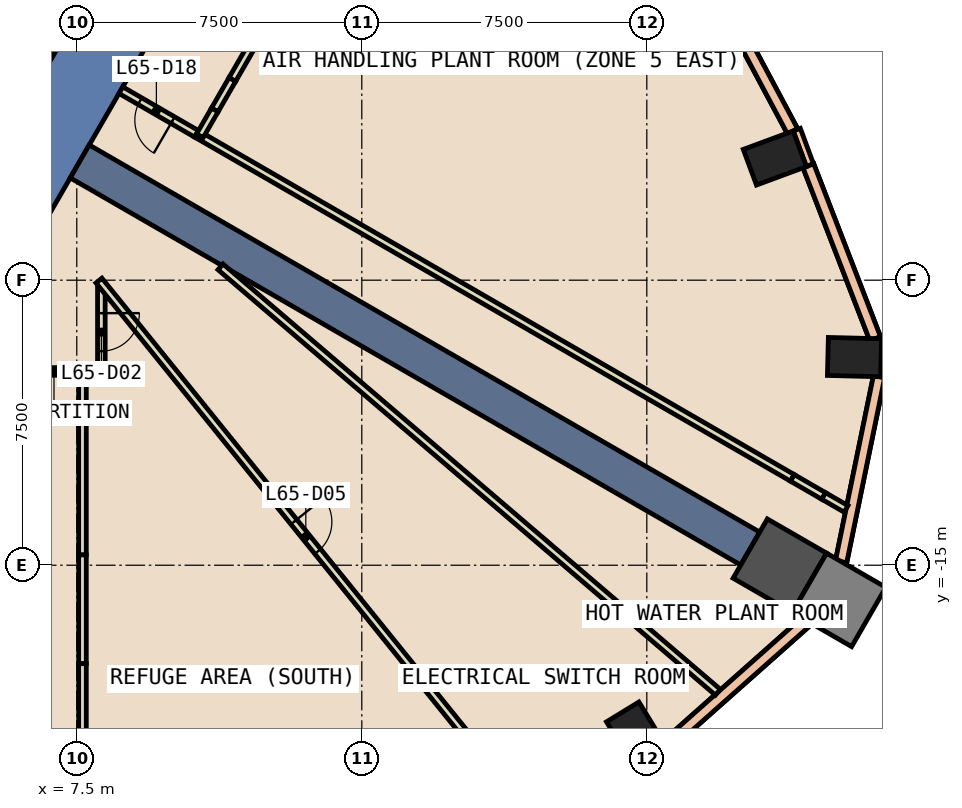
"""IFC4 building model, lengths in metres.
Left out: names, types, materials, properties, quantities, classifications, styles, units other than length and angle.
Written with IfcOpenShell. Run it as: python <this file> out.ifc"""

import sys

from ifc_helpers import new_model, si_unit, direction, frame, frame_2d, origin, origin_2d, place, context, subcontext, project, spatial, polyline, rectangle, outline, extrude, element, fill, save


model = new_model("IFC4")
c1 = context("Model", 3, precision=1e-05, world=origin(), true_north=direction((0.0, 1.0)))
c2 = subcontext(c1, "Body", "Model", "MODEL_VIEW")
j1 = project(units=[si_unit("LENGTHUNIT", "METRE"), si_unit("PLANEANGLEUNIT", "RADIAN")], contexts=[c1])
p1 = place(None, origin())
s1 = spatial("IfcSite", under=j1, at=p1, CompositionType="ELEMENT")
p2 = place(p1, origin())
s2 = spatial("IfcBuilding", under=s1, at=p2, CompositionType="ELEMENT")
p3 = place(p2, frame((0.0, 0.0, 281.0)))
s3 = spatial("IfcBuildingStorey", under=s2, at=p3, CompositionType="ELEMENT", Elevation=281.0)
p4 = place(p3, frame((22.231, -19.457, -0.6), z_axis=(0.0, 0.0, 1.0), x_axis=(0.853341581839, 0.521352227103, 0.0)))
e1 = element("IfcColumn", 1, at=p4, inside=s3, PredefinedType="COLUMN", context=c2, shape_type="SweptSolid", body=[
    extrude(rectangle(XDim=1.0, YDim=1.4, at=origin_2d()), origin(), (0.0, 0.0, 1.0), 5.4),
])
p5 = place(p3, frame((26.001, -15.012, -0.6), z_axis=(0.0, 0.0, 1.0), x_axis=(-0.866025403784, 0.5, 0.0)))
e2 = element("IfcColumn", 2, at=p5, inside=s3, PredefinedType="COLUMN", context=c2, shape_type="SweptSolid", body=[
    extrude(rectangle(XDim=1.8, YDim=1.8, at=origin_2d()), origin(), (0.0, 0.0, 1.0), 5.4),
])
for number, where, z_axis, x_axis in (
    (3, (27.965, -9.524, -0.6), (0.0, 0.0, 1.0), (0.025, 1.0, 0.0)),
    (4, (25.869, -4.285, -0.6), (0.0, 0.0, 1.0), (-0.347, 0.938, 0.0)),
):
    element("IfcColumn", number, at=place(p3, frame(where, z_axis=z_axis, x_axis=x_axis)), inside=s3, PredefinedType="COLUMN", context=c2, shape_type="SweptSolid", body=[
        extrude(rectangle(XDim=1.0, YDim=1.4, at=origin_2d()), origin(), (0.0, 0.0, 1.0), 5.4),
    ])
p6 = place(p3, frame((27.56, -15.912, -0.6), z_axis=(0.0, 0.0, 1.0), x_axis=(-0.866025403784, 0.5, 0.0)))
e5 = element("IfcColumn", 5, at=p6, inside=s3, PredefinedType="COLUMN", context=c2, shape_type="SweptSolid", body=[
    extrude(rectangle(XDim=1.8, YDim=1.8, at=origin_2d()), origin(), (0.0, 0.0, 1.0), 5.4),
])
p7 = place(p3, frame((0.0, 0.0, -0.6)))
e6 = element("IfcWall", 6, at=p7, inside=s3, PredefinedType="SHEAR", context=c2, shape_type="SweptSolid", body=[
    extrude(outline(polyline([(5.774, -7.5), (11.547, 2.5), (9.238, 2.5), (4.619, -5.5), (5.774, -7.5)])), origin(), (0.0, 0.0, 1.0), 5.4),
])
p8 = place(p3, frame((7.578, -4.375, 0.0), z_axis=(0.0, 0.0, 1.0), x_axis=(0.866020754303, -0.500008053052, 0.0)))
e7 = element("IfcWall", 7, at=p8, inside=s3, PredefinedType="SHEAR", context=c2, shape_type="SweptSolid", body=[
    extrude(rectangle(XDim=20.374, YDim=1.0, at=frame_2d((10.187, 0.0))), origin(), (0.0, 0.0, 1.0), 4.8),
])
p9 = place(p3, frame((26.793, -4.477, 0.0), z_axis=(0.0, 0.0, 1.0), x_axis=(-0.346892928577, 0.937904737222, 0.0)))
e8 = element("IfcWall", 8, at=p9, inside=s3, PredefinedType="STANDARD", context=c2, shape_type="SweptSolid", body=[
    extrude(rectangle(XDim=1.0, YDim=0.2, at=frame_2d((0.5, 0.0))), origin(), (0.0, 0.0, 1.0), 4.8),
])
p10 = place(p3, frame((28.753, -10.043, 0.0), z_axis=(0.0, 0.0, 1.0), x_axis=(0.024186470916, 0.999707464524, 0.0)))
e9 = element("IfcWall", 9, at=p10, inside=s3, PredefinedType="STANDARD", context=c2, shape_type="SweptSolid", body=[
    extrude(rectangle(XDim=0.999, YDim=0.2, at=frame_2d((0.5, 0.0))), origin(), (0.0, 0.0, 1.0), 4.8),
])
p11 = place(p3, frame((23.0, -19.758, 0.0), z_axis=(0.0, 0.0, 1.0), x_axis=(0.747938022937, 0.663768569492, 0.0)))
e10 = element("IfcWall", 10, at=p11, inside=s3, PredefinedType="STANDARD", context=c2, shape_type="SweptSolid", body=[
    extrude(rectangle(XDim=4.966, YDim=0.3, at=frame_2d((2.483, 0.0))), origin(), (0.0, 0.0, 1.0), 1.2),
])
p12 = place(p3, frame((23.0, -19.758, 4.0), z_axis=(0.0, 0.0, 1.0), x_axis=(0.747938022937, 0.663768569492, 0.0)))
e11 = element("IfcWall", 11, at=p12, inside=s3, PredefinedType="STANDARD", context=c2, shape_type="SweptSolid", body=[
    extrude(rectangle(XDim=4.966, YDim=0.3, at=frame_2d((2.483, 0.0))), origin(), (0.0, 0.0, 1.0), 0.8),
])
p13 = place(p3, frame((27.613, -14.905, 0.0), z_axis=(0.0, 0.0, 1.0), x_axis=(0.200924793816, 0.979606669654, 0.0)))
e12 = element("IfcWall", 12, at=p13, inside=s3, PredefinedType="STANDARD", context=c2, shape_type="SweptSolid", body=[
    extrude(rectangle(XDim=4.967, YDim=0.3, at=frame_2d((2.484, 0.0))), origin(), (0.0, 0.0, 1.0), 1.2),
])
p14 = place(p3, frame((27.613, -14.905, 4.0), z_axis=(0.0, 0.0, 1.0), x_axis=(0.200924793816, 0.979606669654, 0.0)))
e13 = element("IfcWall", 13, at=p14, inside=s3, PredefinedType="STANDARD", context=c2, shape_type="SweptSolid", body=[
    extrude(rectangle(XDim=4.967, YDim=0.3, at=frame_2d((2.484, 0.0))), origin(), (0.0, 0.0, 1.0), 0.8),
])
p15 = place(p3, frame((28.508, -9.038, 0.0), z_axis=(0.0, 0.0, 1.0), x_axis=(-0.360267544186, 0.932849021335, 0.0)))
e14 = element("IfcWall", 14, at=p15, inside=s3, PredefinedType="STANDARD", context=c2, shape_type="SweptSolid", body=[
    extrude(rectangle(XDim=4.875, YDim=0.3, at=frame_2d((2.437, 0.0))), origin(), (0.0, 0.0, 1.0), 1.2),
])
p16 = place(p3, frame((28.508, -9.038, 4.0), z_axis=(0.0, 0.0, 1.0), x_axis=(-0.360267544186, 0.932849021335, 0.0)))
e15 = element("IfcWall", 15, at=p16, inside=s3, PredefinedType="STANDARD", context=c2, shape_type="SweptSolid", body=[
    extrude(rectangle(XDim=4.875, YDim=0.3, at=frame_2d((2.437, 0.0))), origin(), (0.0, 0.0, 1.0), 0.8),
])
p17 = place(p3, frame((26.334, -3.581, 0.0), z_axis=(0.0, 0.0, 1.0), x_axis=(-0.470796778214, 0.882241686628, 0.0)))
e16 = element("IfcWall", 16, at=p17, inside=s3, PredefinedType="STANDARD", context=c2, shape_type="SweptSolid", body=[
    extrude(rectangle(XDim=5.833, YDim=0.3, at=frame_2d((2.917, 0.0))), origin(), (0.0, 0.0, 1.0), 1.2),
])
p18 = place(p3, frame((26.334, -3.581, 4.0), z_axis=(0.0, 0.0, 1.0), x_axis=(-0.470796778214, 0.882241686628, 0.0)))
e17 = element("IfcWall", 17, at=p18, inside=s3, PredefinedType="STANDARD", context=c2, shape_type="SweptSolid", body=[
    extrude(rectangle(XDim=5.833, YDim=0.3, at=frame_2d((2.917, 0.0))), origin(), (0.0, 0.0, 1.0), 0.8),
])
p19 = place(p3, frame((6.251, -9.901, 0.0), z_axis=(0.0, 0.0, 1.0), x_axis=(1.0, 0.0, 0.0)))
e18 = element("IfcWall", 18, at=p19, inside=s3, PredefinedType="PARTITIONING", context=c2, shape_type="SweptSolid", body=[
    extrude(rectangle(XDim=1.299, YDim=0.2, at=frame_2d((0.649, 0.0))), origin(), (0.0, 0.0, 1.0), 2.4),
])
p20 = place(p3, frame((8.147, -7.688, 0.0), z_axis=(0.0, 0.0, 1.0), x_axis=(0.0, -1.0, 0.0)))
e19 = element("IfcWall", 19, at=p20, inside=s3, PredefinedType="PARTITIONING", context=c2, shape_type="SweptSolid", body=[
    extrude(rectangle(XDim=2.312, YDim=0.2, at=frame_2d((1.156, 0.0))), origin(), (0.0, 0.0, 1.0), 4.8),
])
p21 = place(p20, frame((0.679, 0.0, 0.0)))
e20 = element("IfcOpeningElement", 20, at=p21, cuts=e19, PredefinedType="OPENING", context=c2, shape_type="SweptSolid", body=[
    extrude(rectangle(XDim=1.0, YDim=2.1, at=frame_2d((0.5, 1.05))), frame((0.0, 0.11, 0.0), z_axis=(0.0, -1.0, 0.0), x_axis=(1.0, 0.0, 0.0)), (0.0, 0.0, 1.0), 0.22),
])
p22 = place(p3, frame((7.65, -9.801, 0.0), z_axis=(0.0, 0.0, 1.0), x_axis=(0.0, -1.0, 0.0)))
e21 = element("IfcWall", 21, at=p22, inside=s3, PredefinedType="PARTITIONING", context=c2, shape_type="SweptSolid", body=[
    extrude(rectangle(XDim=0.377, YDim=0.2, at=frame_2d((0.188, 0.0))), origin(), (0.0, 0.0, 1.0), 2.4),
])
p23 = place(p3, frame((8.084, -7.51, 0.0), z_axis=(0.0, 0.0, 1.0), x_axis=(0.628300137945, -0.777971038445, 0.0)))
e22 = element("IfcWall", 22, at=p23, inside=s3, PredefinedType="PARTITIONING", context=c2, shape_type="SweptSolid", body=[
    extrude(rectangle(XDim=16.141, YDim=0.2, at=frame_2d((8.07, 0.0))), origin(), (0.0, 0.0, 1.0), 4.8),
])
p24 = place(p23, frame((8.163, 0.0, 0.0)))
e23 = element("IfcOpeningElement", 23, at=p24, cuts=e22, PredefinedType="OPENING", context=c2, shape_type="SweptSolid", body=[
    extrude(rectangle(XDim=1.0, YDim=2.1, at=frame_2d((0.5, 1.05))), frame((0.0, 0.11, 0.0), z_axis=(0.0, -1.0, 0.0), x_axis=(1.0, 0.0, 0.0)), (0.0, 0.0, 1.0), 0.22),
])
p25 = place(p3, frame((11.282, -7.149, 0.0), z_axis=(0.0, 0.0, 1.0), x_axis=(0.759981627741, -0.64994455571, 0.0)))
e24 = element("IfcWall", 24, at=p25, inside=s3, PredefinedType="PARTITIONING", context=c2, shape_type="SweptSolid", body=[
    extrude(rectangle(XDim=17.222, YDim=0.2, at=frame_2d((8.611, 0.0))), origin(), (0.0, 0.0, 1.0), 4.8),
])
p26 = place(p3, frame((10.652, -3.65, 0.0), z_axis=(0.0, 0.0, 1.0), x_axis=(-0.866079547155, 0.499906209203, 0.0)))
e25 = element("IfcWall", 25, at=p26, inside=s3, PredefinedType="PARTITIONING", context=c2, shape_type="SweptSolid", body=[
    extrude(rectangle(XDim=2.3, YDim=0.2, at=frame_2d((1.15, 0.0))), origin(), (0.0, 0.0, 1.0), 4.8),
])
p27 = place(p26, frame((0.721, 0.0, 0.0)))
e26 = element("IfcOpeningElement", 26, at=p27, cuts=e25, PredefinedType="OPENING", context=c2, shape_type="SweptSolid", body=[
    extrude(rectangle(XDim=1.0, YDim=2.1, at=frame_2d((0.5, 1.05))), frame((0.0, 0.11, 0.0), z_axis=(0.0, -1.0, 0.0), x_axis=(1.0, 0.0, 0.0)), (0.0, 0.0, 1.0), 0.22),
])
p28 = place(p3, frame((10.652, -3.65, 0.0), z_axis=(0.0, 0.0, 1.0), x_axis=(0.86603131093, -0.499989768384, 0.0)))
e27 = element("IfcWall", 27, at=p28, inside=s3, PredefinedType="PARTITIONING", context=c2, shape_type="SweptSolid", body=[
    extrude(rectangle(XDim=18.104, YDim=0.2, at=frame_2d((9.052, 0.0))), origin(), (0.0, 0.0, 1.0), 4.8),
])
p29 = place(p3, frame((7.65, -10.178, 0.0), z_axis=(0.0, 0.0, 1.0), x_axis=(0.0, -1.0, 0.0)))
e28 = element("IfcWall", 28, at=p29, inside=s3, PredefinedType="PARTITIONING", context=c2, shape_type="SweptSolid", body=[
    extrude(rectangle(XDim=4.551, YDim=0.2, at=frame_2d((2.275, 0.0))), origin(), (0.0, 0.0, 1.0), 4.8),
])
p30 = place(p3, frame((7.65, -14.729, 0.0), z_axis=(0.0, 0.0, 1.0), x_axis=(0.0, -1.0, 0.0)))
e29 = element("IfcWall", 29, at=p30, inside=s3, PredefinedType="PARTITIONING", context=c2, shape_type="SweptSolid", body=[
    extrude(rectangle(XDim=2.861, YDim=0.2, at=frame_2d((1.431, 0.0))), origin(), (0.0, 0.0, 1.0), 2.4),
])
p31 = place(p3, frame((7.65, -17.59, 0.0), z_axis=(0.0, 0.0, 1.0), x_axis=(0.0, -1.0, 0.0)))
e30 = element("IfcWall", 30, at=p31, inside=s3, PredefinedType="PARTITIONING", context=c2, shape_type="SweptSolid", body=[
    extrude(rectangle(XDim=3.046, YDim=0.2, at=frame_2d((1.523, 0.0))), origin(), (0.0, 0.0, 1.0), 4.8),
])
p32 = place(p3, frame((26.331, -12.702, 0.0), z_axis=(0.0, 0.0, 1.0), x_axis=(0.865607892982, -0.500722453668, 0.0)))
e31 = element("IfcWall", 31, at=p32, inside=s3, PredefinedType="PARTITIONING", context=c2, shape_type="SweptSolid", body=[
    extrude(rectangle(XDim=0.951, YDim=0.2, at=frame_2d((0.475, 0.0))), origin(), (0.0, 0.0, 1.0), 2.4),
])
p33 = place(p3, frame((27.154, -13.178, 0.0), z_axis=(0.0, 0.0, 1.0), x_axis=(0.866316887664, -0.499494794916, 0.0)))
e32 = element("IfcWall", 32, at=p33, inside=s3, PredefinedType="PARTITIONING", context=c2, shape_type="SweptSolid", body=[
    extrude(rectangle(XDim=0.681, YDim=0.2, at=frame_2d((0.34, 0.0))), origin(), (0.0, 0.0, 1.0), 4.8),
])
p34 = place(p3, frame((12.286, -1.021, 0.0), z_axis=(0.0, 0.0, 1.0), x_axis=(-0.500348091332, -0.865824339864, 0.0)))
e33 = element("IfcWall", 33, at=p34, inside=s3, PredefinedType="PARTITIONING", context=c2, shape_type="SweptSolid", body=[
    extrude(rectangle(XDim=1.385, YDim=0.2, at=frame_2d((0.692, 0.0))), origin(), (0.0, 0.0, 1.0), 4.8),
])
p35 = place(p3, frame((11.593, -2.22, 0.0), z_axis=(0.0, 0.0, 1.0), x_axis=(-0.499547203848, -0.866286667984, 0.0)))
e34 = element("IfcWall", 34, at=p35, inside=s3, PredefinedType="PARTITIONING", context=c2, shape_type="SweptSolid", body=[
    extrude(rectangle(XDim=0.925, YDim=0.2, at=frame_2d((0.462, 0.0))), origin(), (0.0, 0.0, 1.0), 2.4),
])
p36 = place(p3, frame((11.131, -3.021, 0.0), z_axis=(0.0, 0.0, 1.0), x_axis=(-0.500090821976, -0.865972961342, 0.0)))
e35 = element("IfcWall", 35, at=p36, inside=s3, PredefinedType="PARTITIONING", context=c2, shape_type="SweptSolid", body=[
    extrude(rectangle(XDim=0.784, YDim=0.2, at=frame_2d((0.392, 0.0))), origin(), (0.0, 0.0, 1.0), 4.8),
])
p37 = place(p3, frame((5.492, -3.788, 0.0), z_axis=(0.0, 0.0, 1.0), x_axis=(0.500034260056, 0.866005622828, 0.0)))
e36 = element("IfcWall", 36, at=p37, inside=s3, PredefinedType="STANDARD", context=c2, shape_type="SweptSolid", body=[
    extrude(rectangle(XDim=5.399, YDim=0.2, at=frame_2d((2.7, 0.0))), origin(), (0.0, 0.0, 1.0), 4.8),
])
p38 = place(p21, origin())
e37 = element("IfcDoor", 37, at=p38, inside=s3, OperationType="SINGLE_SWING_LEFT", PredefinedType="DOOR", context=c2, shape_type="SweptSolid", body=[
    extrude(rectangle(XDim=1.0, YDim=2.1, at=frame_2d((0.5, 1.05))), frame((0.0, 0.025, 0.0), z_axis=(0.0, -1.0, 0.0), x_axis=(1.0, 0.0, 0.0)), (0.0, 0.0, 1.0), 0.05),
])
fill(e20, e37)
p39 = place(p24, origin())
e38 = element("IfcDoor", 38, at=p39, inside=s3, OperationType="SINGLE_SWING_RIGHT", PredefinedType="DOOR", context=c2, shape_type="SweptSolid", body=[
    extrude(rectangle(XDim=1.0, YDim=2.1, at=frame_2d((0.5, 1.05))), frame((0.0, 0.025, 0.0), z_axis=(0.0, -1.0, 0.0), x_axis=(1.0, 0.0, 0.0)), (0.0, 0.0, 1.0), 0.05),
])
fill(e23, e38)
p40 = place(p27, origin())
e39 = element("IfcDoor", 39, at=p40, inside=s3, OperationType="SINGLE_SWING_LEFT", PredefinedType="DOOR", context=c2, shape_type="SweptSolid", body=[
    extrude(rectangle(XDim=1.0, YDim=2.1, at=frame_2d((0.5, 1.05))), frame((0.0, 0.025, 0.0), z_axis=(0.0, -1.0, 0.0), x_axis=(1.0, 0.0, 0.0)), (0.0, 0.0, 1.0), 0.05),
])
fill(e26, e39)
save(model, sys.argv[1])
